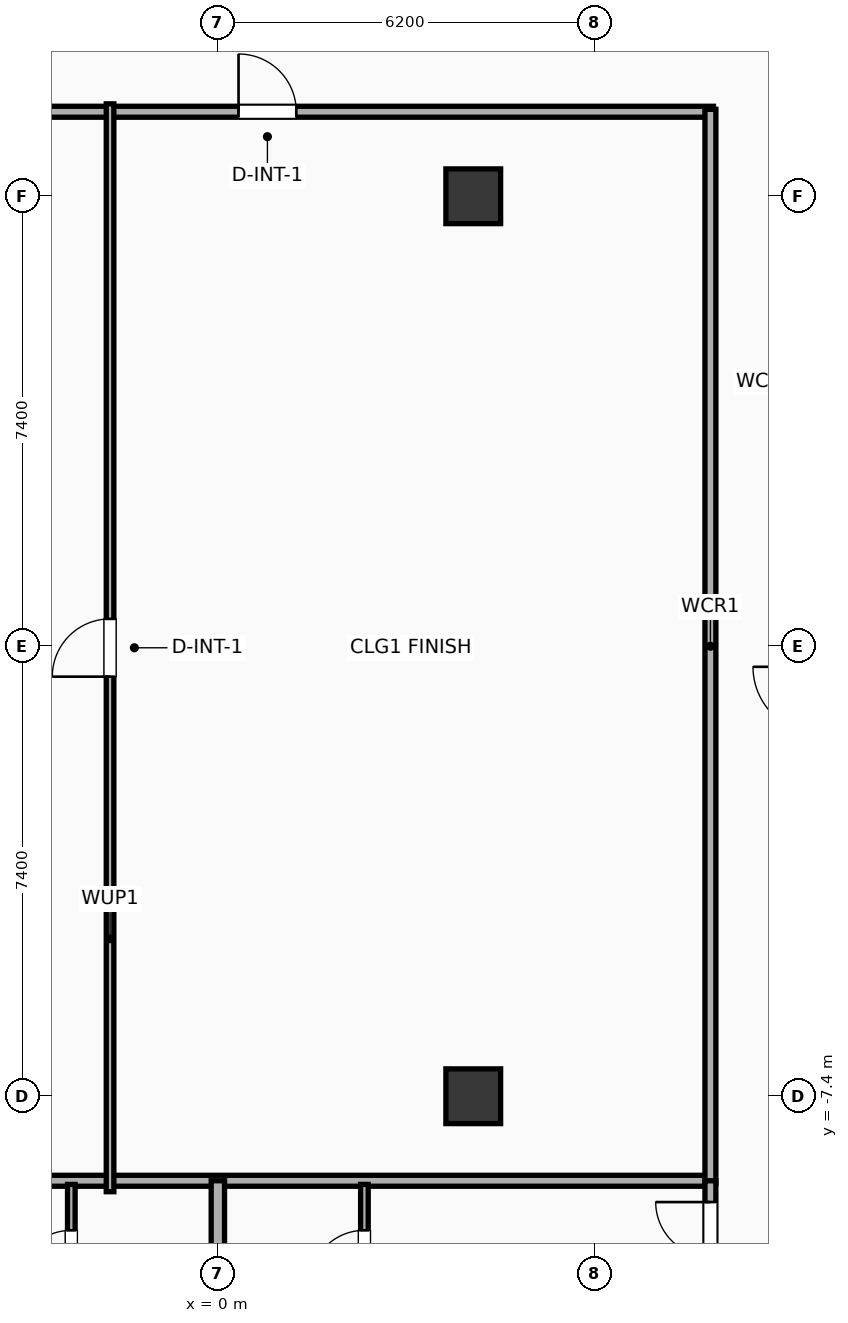
"""IFC4 building model, lengths in metres.
Left out: names, types, materials, properties, quantities, classifications, styles, units other than length and angle.
Written with IfcOpenShell. Run it as: python <this file> out.ifc"""

import sys

from ifc_helpers import new_model, si_unit, direction, frame, frame_2d, origin, origin_2d, place, context, subcontext, project, spatial, rectangle, extrude, element, fill, save


model = new_model("IFC4")
c1 = context("Model", 3, precision=1e-05, world=origin(), true_north=direction((0.0, 1.0)))
c2 = subcontext(c1, "Body", "Model", "MODEL_VIEW")
j1 = project(units=[si_unit("LENGTHUNIT", "METRE"), si_unit("PLANEANGLEUNIT", "RADIAN")], contexts=[c1])
p1 = place(None, origin())
s1 = spatial("IfcSite", under=j1, at=p1, CompositionType="ELEMENT")
p2 = place(p1, origin())
s2 = spatial("IfcBuilding", under=s1, at=p2, CompositionType="ELEMENT")
p3 = place(p2, frame((0.0, 0.0, 208.0)))
s3 = spatial("IfcBuildingStorey", under=s2, at=p3, CompositionType="ELEMENT", Elevation=208.0)
for number, where, z_axis, x_axis in (
    (1, (4.2, -7.4, 0.0), (0.0, 0.0, 1.0), (1.0, 0.0, 0.0)),
    (2, (4.2, 7.4, 0.0), (0.0, 0.0, 1.0), (1.0, 0.0, 0.0)),
):
    element("IfcColumn", number, at=place(p3, frame(where, z_axis=z_axis, x_axis=x_axis)), inside=s3, PredefinedType="COLUMN", context=c2, shape_type="SweptSolid", body=[
        extrude(rectangle(XDim=0.9, YDim=0.9, at=origin_2d()), origin(), (0.0, 0.0, 1.0), 3.9),
    ])
p4 = place(p3, frame((-8.15, 8.79, 0.0), z_axis=(0.0, 0.0, 1.0), x_axis=(1.0, 0.0, 0.0)))
e3 = element("IfcWall", 3, at=p4, inside=s3, PredefinedType="PARTITIONING", context=c2, shape_type="SweptSolid", body=[
    extrude(rectangle(XDim=16.3, YDim=0.18, at=frame_2d((8.15, 0.0))), origin(), (0.0, 0.0, 1.0), 3.65),
])
p5 = place(p4, frame((8.49, 0.0, 0.0)))
e4 = element("IfcOpeningElement", 4, at=p5, cuts=e3, PredefinedType="OPENING", context=c2, shape_type="SweptSolid", body=[
    extrude(rectangle(XDim=0.95, YDim=2.05, at=frame_2d((0.475, 1.025))), frame((0.0, 0.1, 0.0), z_axis=(0.0, -1.0, 0.0), x_axis=(1.0, 0.0, 0.0)), (0.0, 0.0, 1.0), 0.2),
])
p6 = place(p3, frame((-8.15, -8.79, 0.0), z_axis=(0.0, 0.0, 1.0), x_axis=(1.0, 0.0, 0.0)))
e5 = element("IfcWall", 5, at=p6, inside=s3, PredefinedType="PARTITIONING", context=c2, shape_type="SweptSolid", body=[
    extrude(rectangle(XDim=16.3, YDim=0.18, at=frame_2d((8.15, 0.0))), origin(), (0.0, 0.0, 1.0), 3.65),
])
p7 = place(p3, frame((8.1, -8.83, 0.0), z_axis=(0.0, 0.0, 1.0), x_axis=(0.0, 1.0, 0.0)))
e6 = element("IfcWall", 6, at=p7, inside=s3, PredefinedType="PARTITIONING", context=c2, shape_type="SweptSolid", body=[
    extrude(rectangle(XDim=17.66, YDim=0.18, at=frame_2d((8.83, 0.0))), origin(), (0.0, 0.0, 1.0), 3.65),
])
p8 = place(p3, frame((-1.773, -8.97, 0.0), z_axis=(0.0, 0.0, 1.0), x_axis=(0.0, 1.0, 0.0)))
e7 = element("IfcWall", 7, at=p8, inside=s3, PredefinedType="PARTITIONING", context=c2, shape_type="SweptSolid", body=[
    extrude(rectangle(XDim=17.89, YDim=0.125, at=frame_2d((8.945, 0.0))), origin(), (0.0, 0.0, 1.0), 3.65),
])
p9 = place(p8, frame((8.47, 0.0, 0.0)))
e8 = element("IfcOpeningElement", 8, at=p9, cuts=e7, PredefinedType="OPENING", context=c2, shape_type="SweptSolid", body=[
    extrude(rectangle(XDim=0.95, YDim=2.05, at=frame_2d((0.475, 1.025))), frame((0.0, 0.073, 0.0), z_axis=(0.0, -1.0, 0.0), x_axis=(1.0, 0.0, 0.0)), (0.0, 0.0, 1.0), 0.145),
])
p10 = place(p3, frame((-2.41, -11.26, 0.0), z_axis=(0.0, 0.0, 1.0), x_axis=(0.0, 1.0, 0.0)))
e9 = element("IfcWall", 9, at=p10, inside=s3, PredefinedType="PARTITIONING", context=c2, shape_type="SweptSolid", body=[
    extrude(rectangle(XDim=2.41, YDim=0.125, at=frame_2d((1.205, 0.0))), origin(), (0.0, 0.0, 1.0), 3.65),
])
p11 = place(p10, frame((0.755, 0.0, 0.0)))
e10 = element("IfcOpeningElement", 10, at=p11, cuts=e9, PredefinedType="OPENING", context=c2, shape_type="SweptSolid", body=[
    extrude(rectangle(XDim=0.9, YDim=2.05, at=frame_2d((0.45, 1.025))), frame((0.0, 0.073, 0.0), z_axis=(0.0, -1.0, 0.0), x_axis=(1.0, 0.0, 0.0)), (0.0, 0.0, 1.0), 0.145),
])
p12 = place(p3, frame((2.41, -11.26, 0.0), z_axis=(0.0, 0.0, 1.0), x_axis=(0.0, 1.0, 0.0)))
e11 = element("IfcWall", 11, at=p12, inside=s3, PredefinedType="PARTITIONING", context=c2, shape_type="SweptSolid", body=[
    extrude(rectangle(XDim=2.41, YDim=0.125, at=frame_2d((1.205, 0.0))), origin(), (0.0, 0.0, 1.0), 3.65),
])
p13 = place(p12, frame((0.755, 0.0, 0.0)))
e12 = element("IfcOpeningElement", 12, at=p13, cuts=e11, PredefinedType="OPENING", context=c2, shape_type="SweptSolid", body=[
    extrude(rectangle(XDim=0.9, YDim=2.05, at=frame_2d((0.45, 1.025))), frame((0.0, 0.073, 0.0), z_axis=(0.0, -1.0, 0.0), x_axis=(1.0, 0.0, 0.0)), (0.0, 0.0, 1.0), 0.145),
])
p14 = place(p3, frame((8.1, -18.83, 0.0), z_axis=(0.0, 0.0, 1.0), x_axis=(0.0, 1.0, 0.0)))
e13 = element("IfcWall", 13, at=p14, inside=s3, PredefinedType="PARTITIONING", context=c2, shape_type="SweptSolid", body=[
    extrude(rectangle(XDim=10.04, YDim=0.18, at=frame_2d((5.02, 0.0))), origin(), (0.0, 0.0, 1.0), 3.65),
])
p15 = place(p14, frame((8.79, 0.0, 0.0)))
e14 = element("IfcOpeningElement", 14, at=p15, cuts=e13, PredefinedType="OPENING", context=c2, shape_type="SweptSolid", body=[
    extrude(rectangle(XDim=0.9, YDim=2.05, at=frame_2d((0.45, 1.025))), frame((0.0, 0.1, 0.0), z_axis=(0.0, -1.0, 0.0), x_axis=(1.0, 0.0, 0.0)), (0.0, 0.0, 1.0), 0.2),
])
p16 = place(p3, frame((0.0, -18.83, 0.0), z_axis=(0.0, 0.0, 1.0), x_axis=(0.0, 1.0, 0.0)))
e15 = element("IfcWall", 15, at=p16, inside=s3, PredefinedType="PARTITIONING", context=c2, shape_type="SweptSolid", body=[
    extrude(rectangle(XDim=10.04, YDim=0.22, at=frame_2d((5.02, 0.0))), origin(), (0.0, 0.0, 1.0), 3.65),
])
p17 = place(p5, origin())
e16 = element("IfcDoor", 16, at=p17, inside=s3, OperationType="SINGLE_SWING_LEFT", PredefinedType="DOOR", context=c2, shape_type="SweptSolid", body=[
    extrude(rectangle(XDim=0.95, YDim=2.05, at=frame_2d((0.475, 1.025))), frame((0.0, 0.025, 0.0), z_axis=(0.0, -1.0, 0.0), x_axis=(1.0, 0.0, 0.0)), (0.0, 0.0, 1.0), 0.05),
])
fill(e4, e16)
p18 = place(p9, origin())
e17 = element("IfcDoor", 17, at=p18, inside=s3, OperationType="SINGLE_SWING_LEFT", PredefinedType="DOOR", context=c2, shape_type="SweptSolid", body=[
    extrude(rectangle(XDim=0.95, YDim=2.05, at=frame_2d((0.475, 1.025))), frame((0.0, 0.025, 0.0), z_axis=(0.0, -1.0, 0.0), x_axis=(1.0, 0.0, 0.0)), (0.0, 0.0, 1.0), 0.05),
])
fill(e8, e17)
p19 = place(p11, origin())
e18 = element("IfcDoor", 18, at=p19, inside=s3, OperationType="SINGLE_SWING_LEFT", PredefinedType="DOOR", context=c2, shape_type="SweptSolid", body=[
    extrude(rectangle(XDim=0.9, YDim=2.05, at=frame_2d((0.45, 1.025))), frame((0.0, 0.025, 0.0), z_axis=(0.0, -1.0, 0.0), x_axis=(1.0, 0.0, 0.0)), (0.0, 0.0, 1.0), 0.05),
])
fill(e10, e18)
p20 = place(p13, origin())
e19 = element("IfcDoor", 19, at=p20, inside=s3, OperationType="SINGLE_SWING_LEFT", PredefinedType="DOOR", context=c2, shape_type="SweptSolid", body=[
    extrude(rectangle(XDim=0.9, YDim=2.05, at=frame_2d((0.45, 1.025))), frame((0.0, 0.025, 0.0), z_axis=(0.0, -1.0, 0.0), x_axis=(1.0, 0.0, 0.0)), (0.0, 0.0, 1.0), 0.05),
])
fill(e12, e19)
p21 = place(p15, origin())
e20 = element("IfcDoor", 20, at=p21, inside=s3, OperationType="SINGLE_SWING_RIGHT", PredefinedType="DOOR", context=c2, shape_type="SweptSolid", body=[
    extrude(rectangle(XDim=0.9, YDim=2.05, at=frame_2d((0.45, 1.025))), frame((0.0, 0.025, 0.0), z_axis=(0.0, -1.0, 0.0), x_axis=(1.0, 0.0, 0.0)), (0.0, 0.0, 1.0), 0.05),
])
fill(e14, e20)
save(model, sys.argv[1])
